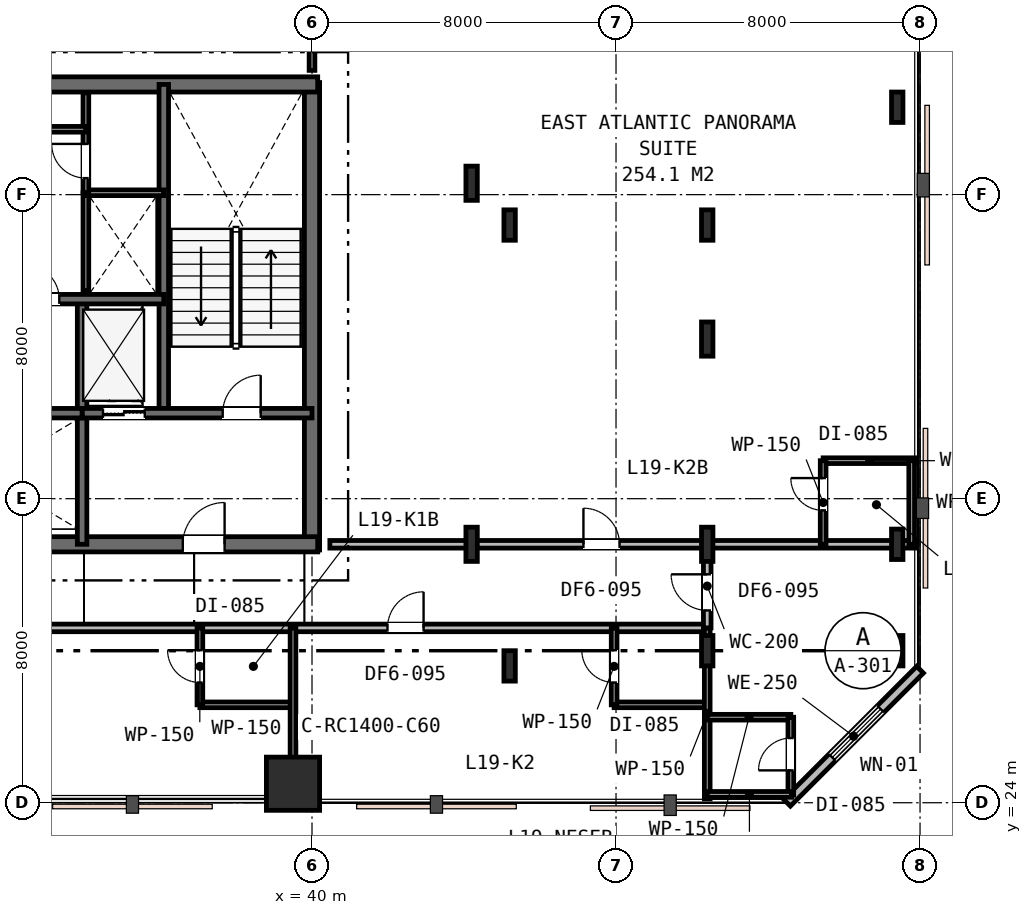
"""IFC4 building model, lengths in metres.
Left out: names, types, materials, properties, quantities, classifications, styles, units other than length and angle.
Written with IfcOpenShell. Run it as: python <this file> out.ifc"""

import sys

from ifc_helpers import new_model, si_unit, direction, frame, frame_2d, origin, origin_2d, place, context, subcontext, project, spatial, rectangle, i_section, extrude, element, fill, save


model = new_model("IFC4")
c1 = context("Model", 3, precision=1e-05, world=origin(), true_north=direction((0.0, 1.0)))
c2 = subcontext(c1, "Body", "Model", "MODEL_VIEW")
j1 = project(units=[si_unit("LENGTHUNIT", "METRE"), si_unit("PLANEANGLEUNIT", "RADIAN")], contexts=[c1])
p1 = place(None, origin())
s1 = spatial("IfcSite", under=j1, at=p1, CompositionType="ELEMENT")
p2 = place(p1, origin())
s2 = spatial("IfcBuilding", under=s1, at=p2, CompositionType="ELEMENT")
p3 = place(p2, frame((0.0, 0.0, 76.2)))
s3 = spatial("IfcBuildingStorey", under=s2, at=p3, CompositionType="ELEMENT", Elevation=76.2)
p4 = place(p3, frame((40.0, 30.65, 0.0), z_axis=(0.0, 0.0, 1.0), x_axis=(0.0, 1.0, 0.0)))
e1 = element("IfcWall", 1, at=p4, inside=s3, PredefinedType="SHEAR", context=c2, shape_type="SweptSolid", body=[
    extrude(rectangle(XDim=12.3, YDim=0.4, at=frame_2d((6.15, 0.0))), origin(), (0.0, 0.0, 1.0), 3.6),
])
p5 = place(p3, frame((15.85, 42.9, 0.0), z_axis=(0.0, 0.0, 1.0), x_axis=(1.0, 0.0, 0.0)))
e2 = element("IfcWall", 2, at=p5, inside=s3, PredefinedType="SHEAR", context=c2, shape_type="SweptSolid", body=[
    extrude(rectangle(XDim=24.3, YDim=0.4, at=frame_2d((12.15, 0.0))), origin(), (0.0, 0.0, 1.0), 3.6),
])
p6 = place(p3, frame((28.95, 30.8, 0.0), z_axis=(0.0, 0.0, 1.0), x_axis=(1.0, 0.0, 0.0)))
e3 = element("IfcWall", 3, at=p6, inside=s3, PredefinedType="SHEAR", context=c2, shape_type="SweptSolid", body=[
    extrude(rectangle(XDim=11.2, YDim=0.4, at=frame_2d((5.6, 0.0))), origin(), (0.0, 0.0, 1.0), 3.6),
])
p7 = place(p6, frame((7.65, 0.0, 0.0)))
e4 = element("IfcOpeningElement", 4, at=p7, cuts=e3, PredefinedType="OPENING", context=c2, shape_type="SweptSolid", body=[
    extrude(rectangle(XDim=1.1, YDim=2.15, at=frame_2d((0.55, 1.075))), frame((0.0, 0.21, 0.0), z_axis=(0.0, -1.0, 0.0), x_axis=(1.0, 0.0, 0.0)), (0.0, 0.0, 1.0), 0.42),
])
p8 = place(p3, frame((36.1, 34.25, 0.0), z_axis=(0.0, 0.0, 1.0), x_axis=(0.0, 1.0, 0.0)))
e5 = element("IfcWall", 5, at=p8, inside=s3, PredefinedType="SHEAR", context=c2, shape_type="SweptSolid", body=[
    extrude(rectangle(XDim=8.65, YDim=0.25, at=frame_2d((4.325, 0.0))), origin(), (0.0, 0.0, 1.0), 3.6),
])
p9 = place(p3, frame((33.95, 30.8, 0.0), z_axis=(0.0, 0.0, 1.0), x_axis=(0.0, 1.0, 0.0)))
e6 = element("IfcWall", 6, at=p9, inside=s3, PredefinedType="SHEAR", context=c2, shape_type="SweptSolid", body=[
    extrude(rectangle(XDim=6.45, YDim=0.25, at=frame_2d((3.225, 0.0))), origin(), (0.0, 0.0, 1.0), 3.6),
])
p10 = place(p3, frame((33.95, 34.25, 0.0), z_axis=(0.0, 0.0, 1.0), x_axis=(1.0, 0.0, 0.0)))
e7 = element("IfcWall", 7, at=p10, inside=s3, PredefinedType="SHEAR", context=c2, shape_type="SweptSolid", body=[
    extrude(rectangle(XDim=6.05, YDim=0.25, at=frame_2d((3.025, 0.0))), origin(), (0.0, 0.0, 1.0), 3.6),
])
p11 = place(p10, frame((3.7, 0.0, 0.0)))
e8 = element("IfcOpeningElement", 8, at=p11, cuts=e7, PredefinedType="OPENING", context=c2, shape_type="SweptSolid", body=[
    extrude(rectangle(XDim=1.0, YDim=2.15, at=frame_2d((0.5, 1.075))), frame((0.0, 0.135, 0.0), z_axis=(0.0, -1.0, 0.0), x_axis=(1.0, 0.0, 0.0)), (0.0, 0.0, 1.0), 0.27),
])
p12 = place(p10, frame((0.55, 0.0, 0.0)))
e9 = element("IfcOpeningElement", 9, at=p12, cuts=e7, PredefinedType="OPENING", context=c2, shape_type="SweptSolid", body=[
    extrude(rectangle(XDim=1.1, YDim=2.15, at=frame_2d((0.55, 1.075))), frame((0.0, 0.135, 0.0), z_axis=(0.0, -1.0, 0.0), x_axis=(1.0, 0.0, 0.0)), (0.0, 0.0, 1.0), 0.27),
])
p13 = place(p3, frame((28.95, 34.25, 0.0), z_axis=(0.0, 0.0, 1.0), x_axis=(1.0, 0.0, 0.0)))
e10 = element("IfcWall", 10, at=p13, inside=s3, PredefinedType="SHEAR", context=c2, shape_type="SweptSolid", body=[
    extrude(rectangle(XDim=5.0, YDim=0.25, at=frame_2d((2.5, 0.0))), origin(), (0.0, 0.0, 1.0), 3.6),
])
p14 = place(p3, frame((19.9, 37.25, 0.0), z_axis=(0.0, 0.0, 1.0), x_axis=(1.0, 0.0, 0.0)))
e11 = element("IfcWall", 11, at=p14, inside=s3, PredefinedType="SHEAR", context=c2, shape_type="SweptSolid", body=[
    extrude(rectangle(XDim=16.2, YDim=0.25, at=frame_2d((8.1, 0.0))), origin(), (0.0, 0.0, 1.0), 3.6),
])
p15 = place(p14, frame((12.55, 0.0, 0.0)))
e12 = element("IfcOpeningElement", 12, at=p15, cuts=e11, PredefinedType="OPENING", context=c2, shape_type="SweptSolid", body=[
    extrude(rectangle(XDim=0.9, YDim=2.15, at=frame_2d((0.45, 1.075))), frame((0.0, 0.135, 0.0), z_axis=(0.0, -1.0, 0.0), x_axis=(1.0, 0.0, 0.0)), (0.0, 0.0, 1.0), 0.27),
])
p16 = place(p3, frame((39.5, 24.5, 0.0), z_axis=(0.0, 0.0, 1.0), x_axis=(1.0, 0.0, 0.0)))
e13 = element("IfcColumn", 13, at=p16, inside=s3, PredefinedType="COLUMN", context=c2, shape_type="SweptSolid", body=[
    extrude(rectangle(XDim=1.4, YDim=1.4, at=origin_2d()), origin(), (0.0, 0.0, 1.0), 3.6),
])
for number, where, z_axis, x_axis in (
    (14, (45.2, 27.6, 0.0), (0.0, 0.0, 1.0), (1.0, 0.0, 0.0)),
    (15, (45.2, 39.2, 0.0), (0.0, 0.0, 1.0), (1.0, 0.0, 0.0)),
    (16, (50.4, 28.0, 0.0), (0.0, 0.0, 1.0), (1.0, 0.0, 0.0)),
    (17, (50.4, 39.2, 0.0), (0.0, 0.0, 1.0), (1.0, 0.0, 0.0)),
    (18, (55.4, 28.0, 0.0), (0.0, 0.0, 1.0), (1.0, 0.0, 0.0)),
    (19, (55.4, 30.8, 0.0), (0.0, 0.0, 1.0), (1.0, 0.0, 0.0)),
    (20, (55.4, 42.3, 0.0), (0.0, 0.0, 1.0), (1.0, 0.0, 0.0)),
):
    element("IfcColumn", number, at=place(p3, frame(where, z_axis=z_axis, x_axis=x_axis)), inside=s3, PredefinedType="COLUMN", context=c2, shape_type="SweptSolid", body=[
        extrude(i_section(OverallWidth=0.3, OverallDepth=0.8, WebThickness=0.018, FlangeThickness=0.033, FilletRadius=0.03, at=origin_2d()), origin(), (0.0, 0.0, 1.0), 3.6),
    ])
for number, where, z_axis, x_axis in (
    (21, (44.2, 30.8, 0.0), (0.0, 0.0, 1.0), (1.0, 0.0, 0.0)),
    (22, (44.2, 40.3, 0.0), (0.0, 0.0, 1.0), (1.0, 0.0, 0.0)),
    (23, (50.4, 30.8, 0.0), (0.0, 0.0, 1.0), (1.0, 0.0, 0.0)),
    (24, (50.4, 36.2, 0.0), (0.0, 0.0, 1.0), (1.0, 0.0, 0.0)),
):
    element("IfcColumn", number, at=place(p3, frame(where, z_axis=z_axis, x_axis=x_axis)), inside=s3, PredefinedType="COLUMN", context=c2, shape_type="SweptSolid", body=[
        extrude(i_section(OverallWidth=0.3, OverallDepth=0.9, WebThickness=0.018, FlangeThickness=0.035, FilletRadius=0.03, at=origin_2d()), origin(), (0.0, 0.0, 1.0), 3.6),
    ])
p17 = place(p3, frame((52.5, 24.0, 0.0), z_axis=(0.0, 0.0, 1.0), x_axis=(0.707106781187, 0.707106781187, 0.0)))
e25 = element("IfcWall", 25, at=p17, inside=s3, PredefinedType="STANDARD", context=c2, shape_type="SweptSolid", body=[
    extrude(rectangle(XDim=4.95, YDim=0.25, at=frame_2d((2.475, 0.0))), origin(), (0.0, 0.0, 1.0), 3.24),
])
p18 = place(p17, frame((1.685, 0.0, 0.75)))
e26 = element("IfcOpeningElement", 26, at=p18, cuts=e25, PredefinedType="OPENING", context=c2, shape_type="SweptSolid", body=[
    extrude(rectangle(XDim=1.8, YDim=1.85, at=frame_2d((0.9, 0.925))), frame((0.0, 0.135, 0.0), z_axis=(0.0, -1.0, 0.0), x_axis=(1.0, 0.0, 0.0)), (0.0, 0.0, 1.0), 0.27),
])
p19 = place(p3, frame((34.05, 37.473, 0.0), z_axis=(0.0, 0.0, 1.0), x_axis=(0.0, 1.0, 0.0)))
e27 = element("IfcWall", 27, at=p19, inside=s3, PredefinedType="PLUMBINGWALL", context=c2, shape_type="SweptSolid", body=[
    extrude(rectangle(XDim=2.577, YDim=0.15, at=frame_2d((1.288, 0.0))), origin(), (0.0, 0.0, 1.0), 3.24),
])
p20 = place(p3, frame((34.05, 40.05, 0.0), z_axis=(0.0, 0.0, 1.0), x_axis=(1.0, 0.0, 0.0)))
e28 = element("IfcWall", 28, at=p20, inside=s3, PredefinedType="PARTITIONING", context=c2, shape_type="SweptSolid", body=[
    extrude(rectangle(XDim=2.05, YDim=0.15, at=frame_2d((1.025, 0.0))), origin(), (0.0, 0.0, 1.0), 3.24),
])
p21 = place(p3, frame((34.05, 40.05, 0.0), z_axis=(0.0, 0.0, 1.0), x_axis=(0.0, 1.0, 0.0)))
e29 = element("IfcWall", 29, at=p21, inside=s3, PredefinedType="PARTITIONING", context=c2, shape_type="SweptSolid", body=[
    extrude(rectangle(XDim=2.63, YDim=0.15, at=frame_2d((1.315, 0.0))), origin(), (0.0, 0.0, 1.0), 3.24),
])
p22 = place(p21, frame((0.385, 0.0, 0.0)))
e30 = element("IfcOpeningElement", 30, at=p22, cuts=e29, PredefinedType="OPENING", context=c2, shape_type="SweptSolid", body=[
    extrude(rectangle(XDim=0.9, YDim=2.15, at=frame_2d((0.45, 1.075))), frame((0.0, 0.085, 0.0), z_axis=(0.0, -1.0, 0.0), x_axis=(1.0, 0.0, 0.0)), (0.0, 0.0, 1.0), 0.17),
])
p23 = place(p3, frame((22.08, 41.72, 0.0), z_axis=(0.0, 0.0, 1.0), x_axis=(1.0, 0.0, 0.0)))
e31 = element("IfcWall", 31, at=p23, inside=s3, PredefinedType="PARTITIONING", context=c2, shape_type="SweptSolid", body=[
    extrude(rectangle(XDim=11.97, YDim=0.15, at=frame_2d((5.985, 0.0))), origin(), (0.0, 0.0, 1.0), 3.24),
])
p24 = place(p23, frame((5.535, 0.0, 0.0)))
e32 = element("IfcOpeningElement", 32, at=p24, cuts=e31, PredefinedType="OPENING", context=c2, shape_type="SweptSolid", body=[
    extrude(rectangle(XDim=0.9, YDim=2.15, at=frame_2d((0.45, 1.075))), frame((0.0, 0.085, 0.0), z_axis=(0.0, -1.0, 0.0), x_axis=(1.0, 0.0, 0.0)), (0.0, 0.0, 1.0), 0.17),
])
p25 = place(p3, frame((14.0, 28.6, 0.0), z_axis=(0.0, 0.0, 1.0), x_axis=(1.0, 0.0, 0.0)))
e33 = element("IfcWall", 33, at=p25, inside=s3, PredefinedType="PARTITIONING", context=c2, shape_type="SweptSolid", body=[
    extrude(rectangle(XDim=36.4, YDim=0.2, at=frame_2d((18.2, 0.0))), origin(), (0.0, 0.0, 1.0), 2.74),
])
p26 = place(p25, frame((15.475, 0.0, 0.0)))
e34 = element("IfcOpeningElement", 34, at=p26, cuts=e33, PredefinedType="OPENING", context=c2, shape_type="SweptSolid", body=[
    extrude(rectangle(XDim=0.95, YDim=2.15, at=frame_2d((0.475, 1.075))), frame((0.0, 0.11, 0.0), z_axis=(0.0, -1.0, 0.0), x_axis=(1.0, 0.0, 0.0)), (0.0, 0.0, 1.0), 0.22),
])
p27 = place(p25, frame((27.986, 0.0, 0.0)))
e35 = element("IfcOpeningElement", 35, at=p27, cuts=e33, PredefinedType="OPENING", context=c2, shape_type="SweptSolid", body=[
    extrude(rectangle(XDim=0.95, YDim=2.15, at=frame_2d((0.475, 1.075))), frame((0.0, 0.11, 0.0), z_axis=(0.0, -1.0, 0.0), x_axis=(1.0, 0.0, 0.0)), (0.0, 0.0, 1.0), 0.22),
])
p28 = place(p3, frame((40.0, 43.27, 0.0), z_axis=(0.0, 0.0, 1.0), x_axis=(0.0, 1.0, 0.0)))
e36 = element("IfcWall", 36, at=p28, inside=s3, PredefinedType="PARTITIONING", context=c2, shape_type="SweptSolid", body=[
    extrude(rectangle(XDim=4.63, YDim=0.15, at=frame_2d((2.315, 0.0))), origin(), (0.0, 0.0, 1.0), 2.83),
])
p29 = place(p3, frame((37.05, 26.576, 0.0), z_axis=(0.0, 0.0, 1.0), x_axis=(1.0, 0.0, 0.0)))
e37 = element("IfcWall", 37, at=p29, inside=s3, PredefinedType="PARTITIONING", context=c2, shape_type="SweptSolid", body=[
    extrude(rectangle(XDim=2.45, YDim=0.15, at=frame_2d((1.225, 0.0))), origin(), (0.0, 0.0, 1.0), 2.74),
])
p30 = place(p3, frame((37.05, 26.576, 0.0), z_axis=(0.0, 0.0, 1.0), x_axis=(0.0, 1.0, 0.0)))
e38 = element("IfcWall", 38, at=p30, inside=s3, PredefinedType="PARTITIONING", context=c2, shape_type="SweptSolid", body=[
    extrude(rectangle(XDim=2.024, YDim=0.15, at=frame_2d((1.012, 0.0))), origin(), (0.0, 0.0, 1.0), 2.93),
])
p31 = place(p30, frame((0.587, 0.0, 0.0)))
e39 = element("IfcOpeningElement", 39, at=p31, cuts=e38, PredefinedType="OPENING", context=c2, shape_type="SweptSolid", body=[
    extrude(rectangle(XDim=0.85, YDim=2.15, at=frame_2d((0.425, 1.075))), frame((0.0, 0.085, 0.0), z_axis=(0.0, -1.0, 0.0), x_axis=(1.0, 0.0, 0.0)), (0.0, 0.0, 1.0), 0.17),
])
p32 = place(p3, frame((39.5, 28.6, 0.0), z_axis=(0.0, 0.0, 1.0), x_axis=(0.0, -1.0, 0.0)))
e40 = element("IfcWall", 40, at=p32, inside=s3, PredefinedType="PARTITIONING", context=c2, shape_type="SweptSolid", body=[
    extrude(rectangle(XDim=4.5, YDim=0.15, at=frame_2d((2.25, 0.0))), origin(), (0.0, 0.0, 1.0), 2.74),
])
p33 = place(p3, frame((47.95, 26.576, 0.0), z_axis=(0.0, 0.0, 1.0), x_axis=(1.0, 0.0, 0.0)))
e41 = element("IfcWall", 41, at=p33, inside=s3, PredefinedType="PARTITIONING", context=c2, shape_type="SweptSolid", body=[
    extrude(rectangle(XDim=2.45, YDim=0.15, at=frame_2d((1.225, 0.0))), origin(), (0.0, 0.0, 1.0), 3.24),
])
p34 = place(p3, frame((47.95, 26.576, 0.0), z_axis=(0.0, 0.0, 1.0), x_axis=(0.0, 1.0, 0.0)))
e42 = element("IfcWall", 42, at=p34, inside=s3, PredefinedType="PARTITIONING", context=c2, shape_type="SweptSolid", body=[
    extrude(rectangle(XDim=2.024, YDim=0.15, at=frame_2d((1.012, 0.0))), origin(), (0.0, 0.0, 1.0), 3.24),
])
p35 = place(p34, frame((0.587, 0.0, 0.0)))
e43 = element("IfcOpeningElement", 43, at=p35, cuts=e42, PredefinedType="OPENING", context=c2, shape_type="SweptSolid", body=[
    extrude(rectangle(XDim=0.85, YDim=2.15, at=frame_2d((0.425, 1.075))), frame((0.0, 0.085, 0.0), z_axis=(0.0, -1.0, 0.0), x_axis=(1.0, 0.0, 0.0)), (0.0, 0.0, 1.0), 0.17),
])
p36 = place(p3, frame((50.4, 28.6, 0.0), z_axis=(0.0, 0.0, 1.0), x_axis=(0.0, -1.0, 0.0)))
e44 = element("IfcWall", 44, at=p36, inside=s3, PredefinedType="PARTITIONING", context=c2, shape_type="SweptSolid", body=[
    extrude(rectangle(XDim=4.5, YDim=0.15, at=frame_2d((2.25, 0.0))), origin(), (0.0, 0.0, 1.0), 2.74),
])
p37 = place(p3, frame((40.47, 30.8, 0.0), z_axis=(0.0, 0.0, 1.0), x_axis=(1.0, 0.0, 0.0)))
e45 = element("IfcWall", 45, at=p37, inside=s3, PredefinedType="PARTITIONING", context=c2, shape_type="SweptSolid", body=[
    extrude(rectangle(XDim=15.43, YDim=0.2, at=frame_2d((7.715, 0.0))), origin(), (0.0, 0.0, 1.0), 2.74),
])
p38 = place(p37, frame((6.673, 0.0, 0.0)))
e46 = element("IfcOpeningElement", 46, at=p38, cuts=e45, PredefinedType="OPENING", context=c2, shape_type="SweptSolid", body=[
    extrude(rectangle(XDim=0.95, YDim=2.15, at=frame_2d((0.475, 1.075))), frame((0.0, 0.11, 0.0), z_axis=(0.0, -1.0, 0.0), x_axis=(1.0, 0.0, 0.0)), (0.0, 0.0, 1.0), 0.22),
])
p39 = place(p3, frame((53.45, 33.0, 0.0), z_axis=(0.0, 0.0, 1.0), x_axis=(1.0, 0.0, 0.0)))
e47 = element("IfcWall", 47, at=p39, inside=s3, PredefinedType="PARTITIONING", context=c2, shape_type="SweptSolid", body=[
    extrude(rectangle(XDim=2.45, YDim=0.15, at=frame_2d((1.225, 0.0))), origin(), (0.0, 0.0, 1.0), 2.83),
])
p40 = place(p3, frame((53.45, 30.8, 0.0), z_axis=(0.0, 0.0, 1.0), x_axis=(0.0, 1.0, 0.0)))
e48 = element("IfcWall", 48, at=p40, inside=s3, PredefinedType="PARTITIONING", context=c2, shape_type="SweptSolid", body=[
    extrude(rectangle(XDim=2.2, YDim=0.15, at=frame_2d((1.1, 0.0))), origin(), (0.0, 0.0, 1.0), 2.74),
])
p41 = place(p40, frame((0.892, 0.0, 0.0)))
e49 = element("IfcOpeningElement", 49, at=p41, cuts=e48, PredefinedType="OPENING", context=c2, shape_type="SweptSolid", body=[
    extrude(rectangle(XDim=0.85, YDim=2.15, at=frame_2d((0.425, 1.075))), frame((0.0, 0.085, 0.0), z_axis=(0.0, -1.0, 0.0), x_axis=(1.0, 0.0, 0.0)), (0.0, 0.0, 1.0), 0.17),
])
p42 = place(p3, frame((55.78, 33.0, 0.0), z_axis=(0.0, 0.0, 1.0), x_axis=(0.0, -1.0, 0.0)))
e50 = element("IfcWall", 50, at=p42, inside=s3, PredefinedType="PARTITIONING", context=c2, shape_type="SweptSolid", body=[
    extrude(rectangle(XDim=2.2, YDim=0.15, at=frame_2d((1.1, 0.0))), origin(), (0.0, 0.0, 1.0), 2.74),
])
p43 = place(p3, frame((50.4, 28.6, 0.0), z_axis=(0.0, 0.0, 1.0), x_axis=(0.0, 1.0, 0.0)))
e51 = element("IfcWall", 51, at=p43, inside=s3, PredefinedType="PARTITIONING", context=c2, shape_type="SweptSolid", body=[
    extrude(rectangle(XDim=2.2, YDim=0.2, at=frame_2d((1.1, 0.0))), origin(), (0.0, 0.0, 1.0), 2.74),
])
p44 = place(p43, frame((0.46, 0.0, 0.0)))
e52 = element("IfcOpeningElement", 52, at=p44, cuts=e51, PredefinedType="OPENING", context=c2, shape_type="SweptSolid", body=[
    extrude(rectangle(XDim=0.95, YDim=2.15, at=frame_2d((0.475, 1.075))), frame((0.0, 0.11, 0.0), z_axis=(0.0, -1.0, 0.0), x_axis=(1.0, 0.0, 0.0)), (0.0, 0.0, 1.0), 0.22),
])
p45 = place(p3, frame((50.4, 26.25, 0.0), z_axis=(0.0, 0.0, 1.0), x_axis=(1.0, 0.0, 0.0)))
e53 = element("IfcWall", 53, at=p45, inside=s3, PredefinedType="PARTITIONING", context=c2, shape_type="SweptSolid", body=[
    extrude(rectangle(XDim=2.2, YDim=0.15, at=frame_2d((1.1, 0.0))), origin(), (0.0, 0.0, 1.0), 3.24),
])
p46 = place(p3, frame((52.6, 24.2, 0.0), z_axis=(0.0, 0.0, 1.0), x_axis=(0.0, 1.0, 0.0)))
e54 = element("IfcWall", 54, at=p46, inside=s3, PredefinedType="PARTITIONING", context=c2, shape_type="SweptSolid", body=[
    extrude(rectangle(XDim=2.05, YDim=0.15, at=frame_2d((1.025, 0.0))), origin(), (0.0, 0.0, 1.0), 3.24),
])
p47 = place(p46, frame((0.651, 0.0, 0.0)))
e55 = element("IfcOpeningElement", 55, at=p47, cuts=e54, PredefinedType="OPENING", context=c2, shape_type="SweptSolid", body=[
    extrude(rectangle(XDim=0.85, YDim=2.15, at=frame_2d((0.425, 1.075))), frame((0.0, 0.085, 0.0), z_axis=(0.0, -1.0, 0.0), x_axis=(1.0, 0.0, 0.0)), (0.0, 0.0, 1.0), 0.17),
])
p48 = place(p3, frame((52.62, 24.22, 0.0), z_axis=(0.0, 0.0, 1.0), x_axis=(-1.0, 0.0, 0.0)))
e56 = element("IfcWall", 56, at=p48, inside=s3, PredefinedType="PARTITIONING", context=c2, shape_type="SweptSolid", body=[
    extrude(rectangle(XDim=2.22, YDim=0.15, at=frame_2d((1.11, 0.0))), origin(), (0.0, 0.0, 1.0), 3.24),
])
p49 = place(p18, origin())
e57 = element("IfcWindow", 57, at=p49, inside=s3, PartitioningType="SINGLE_PANEL", PredefinedType="WINDOW", context=c2, shape_type="SweptSolid", body=[
    extrude(rectangle(XDim=1.8, YDim=1.85, at=frame_2d((0.9, 0.925))), frame((0.0, 0.03, 0.0), z_axis=(0.0, -1.0, 0.0), x_axis=(1.0, 0.0, 0.0)), (0.0, 0.0, 1.0), 0.06),
])
fill(e26, e57)
p50 = place(p11, origin())
e58 = element("IfcDoor", 58, at=p50, inside=s3, OperationType="SINGLE_SWING_RIGHT", PredefinedType="DOOR", context=c2, shape_type="SweptSolid", body=[
    extrude(rectangle(XDim=1.0, YDim=2.15, at=frame_2d((0.5, 1.075))), frame((0.0, 0.025, 0.0), z_axis=(0.0, -1.0, 0.0), x_axis=(1.0, 0.0, 0.0)), (0.0, 0.0, 1.0), 0.05),
])
fill(e8, e58)
p51 = place(p7, origin())
e59 = element("IfcDoor", 59, at=p51, inside=s3, OperationType="SINGLE_SWING_RIGHT", PredefinedType="DOOR", context=c2, shape_type="SweptSolid", body=[
    extrude(rectangle(XDim=1.1, YDim=2.15, at=frame_2d((0.55, 1.075))), frame((0.0, 0.025, 0.0), z_axis=(0.0, -1.0, 0.0), x_axis=(1.0, 0.0, 0.0)), (0.0, 0.0, 1.0), 0.05),
])
fill(e4, e59)
p52 = place(p15, origin())
e60 = element("IfcDoor", 60, at=p52, inside=s3, OperationType="SINGLE_SWING_LEFT", PredefinedType="DOOR", context=c2, shape_type="SweptSolid", body=[
    extrude(rectangle(XDim=0.9, YDim=2.15, at=frame_2d((0.45, 1.075))), frame((0.0, 0.025, 0.0), z_axis=(0.0, -1.0, 0.0), x_axis=(1.0, 0.0, 0.0)), (0.0, 0.0, 1.0), 0.05),
])
fill(e12, e60)
p53 = place(p22, origin())
e61 = element("IfcDoor", 61, at=p53, inside=s3, OperationType="SINGLE_SWING_RIGHT", PredefinedType="DOOR", context=c2, shape_type="SweptSolid", body=[
    extrude(rectangle(XDim=0.9, YDim=2.15, at=frame_2d((0.45, 1.075))), frame((0.0, 0.025, 0.0), z_axis=(0.0, -1.0, 0.0), x_axis=(1.0, 0.0, 0.0)), (0.0, 0.0, 1.0), 0.05),
])
fill(e30, e61)
p54 = place(p31, origin())
e62 = element("IfcDoor", 62, at=p54, inside=s3, OperationType="SINGLE_SWING_RIGHT", PredefinedType="DOOR", context=c2, shape_type="SweptSolid", body=[
    extrude(rectangle(XDim=0.85, YDim=2.15, at=frame_2d((0.425, 1.075))), frame((0.0, 0.025, 0.0), z_axis=(0.0, -1.0, 0.0), x_axis=(1.0, 0.0, 0.0)), (0.0, 0.0, 1.0), 0.05),
])
fill(e39, e62)
p55 = place(p27, origin())
e63 = element("IfcDoor", 63, at=p55, inside=s3, OperationType="SINGLE_SWING_RIGHT", PredefinedType="DOOR", context=c2, shape_type="SweptSolid", body=[
    extrude(rectangle(XDim=0.95, YDim=2.15, at=frame_2d((0.475, 1.075))), frame((0.0, 0.025, 0.0), z_axis=(0.0, -1.0, 0.0), x_axis=(1.0, 0.0, 0.0)), (0.0, 0.0, 1.0), 0.05),
])
fill(e35, e63)
p56 = place(p35, origin())
e64 = element("IfcDoor", 64, at=p56, inside=s3, OperationType="SINGLE_SWING_RIGHT", PredefinedType="DOOR", context=c2, shape_type="SweptSolid", body=[
    extrude(rectangle(XDim=0.85, YDim=2.15, at=frame_2d((0.425, 1.075))), frame((0.0, 0.025, 0.0), z_axis=(0.0, -1.0, 0.0), x_axis=(1.0, 0.0, 0.0)), (0.0, 0.0, 1.0), 0.05),
])
fill(e43, e64)
p57 = place(p38, origin())
e65 = element("IfcDoor", 65, at=p57, inside=s3, OperationType="SINGLE_SWING_LEFT", PredefinedType="DOOR", context=c2, shape_type="SweptSolid", body=[
    extrude(rectangle(XDim=0.95, YDim=2.15, at=frame_2d((0.475, 1.075))), frame((0.0, 0.025, 0.0), z_axis=(0.0, -1.0, 0.0), x_axis=(1.0, 0.0, 0.0)), (0.0, 0.0, 1.0), 0.05),
])
fill(e46, e65)
p58 = place(p41, origin())
e66 = element("IfcDoor", 66, at=p58, inside=s3, OperationType="SINGLE_SWING_RIGHT", PredefinedType="DOOR", context=c2, shape_type="SweptSolid", body=[
    extrude(rectangle(XDim=0.85, YDim=2.15, at=frame_2d((0.425, 1.075))), frame((0.0, 0.025, 0.0), z_axis=(0.0, -1.0, 0.0), x_axis=(1.0, 0.0, 0.0)), (0.0, 0.0, 1.0), 0.05),
])
fill(e49, e66)
p59 = place(p44, origin())
e67 = element("IfcDoor", 67, at=p59, inside=s3, OperationType="SINGLE_SWING_RIGHT", PredefinedType="DOOR", context=c2, shape_type="SweptSolid", body=[
    extrude(rectangle(XDim=0.95, YDim=2.15, at=frame_2d((0.475, 1.075))), frame((0.0, 0.025, 0.0), z_axis=(0.0, -1.0, 0.0), x_axis=(1.0, 0.0, 0.0)), (0.0, 0.0, 1.0), 0.05),
])
fill(e52, e67)
p60 = place(p47, origin())
e68 = element("IfcDoor", 68, at=p60, inside=s3, OperationType="SINGLE_SWING_LEFT", PredefinedType="DOOR", context=c2, shape_type="SweptSolid", body=[
    extrude(rectangle(XDim=0.85, YDim=2.15, at=frame_2d((0.425, 1.075))), frame((0.0, 0.025, 0.0), z_axis=(0.0, -1.0, 0.0), x_axis=(1.0, 0.0, 0.0)), (0.0, 0.0, 1.0), 0.05),
])
fill(e55, e68)
p61 = place(p12, origin())
e69 = element("IfcDoor", 69, at=p61, inside=s3, OperationType="DOUBLE_DOOR_SLIDING", PredefinedType="DOOR", context=c2, shape_type="SweptSolid", body=[
    extrude(rectangle(XDim=1.1, YDim=2.15, at=frame_2d((0.55, 1.075))), frame((0.0, 0.025, 0.0), z_axis=(0.0, -1.0, 0.0), x_axis=(1.0, 0.0, 0.0)), (0.0, 0.0, 1.0), 0.05),
])
fill(e9, e69)
save(model, sys.argv[1])
